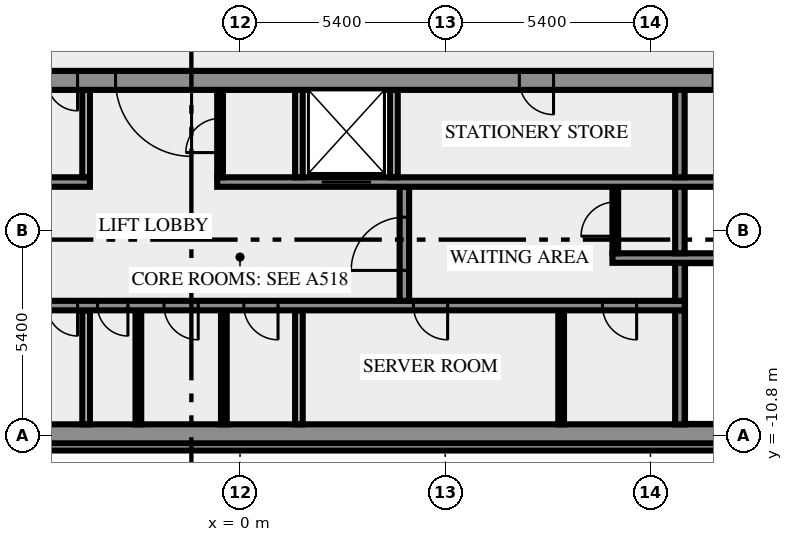
"""IFC4 building model, lengths in metres.
Left out: names, types, materials, properties, quantities, classifications, styles, units other than length and angle.
Written with IfcOpenShell. Run it as: python <this file> out.ifc"""

import sys

from ifc_helpers import new_model, si_unit, direction, frame, frame_2d, origin, place, context, subcontext, project, spatial, rectangle, extrude, element, fill, save


model = new_model("IFC4")
c1 = context("Model", 3, precision=1e-05, world=origin(), true_north=direction((0.0, 1.0)))
c2 = subcontext(c1, "Body", "Model", "MODEL_VIEW")
j1 = project(units=[si_unit("LENGTHUNIT", "METRE"), si_unit("PLANEANGLEUNIT", "RADIAN")], contexts=[c1])
p1 = place(None, origin())
s1 = spatial("IfcSite", under=j1, at=p1, CompositionType="ELEMENT")
p2 = place(p1, origin())
s2 = spatial("IfcBuilding", under=s1, at=p2, CompositionType="ELEMENT")
p3 = place(p2, frame((0.0, 0.0, 311.0)))
s3 = spatial("IfcBuildingStorey", under=s2, at=p3, CompositionType="ELEMENT", Elevation=311.0)
p4 = place(p3, frame((-17.444, -11.088, 0.0), z_axis=(0.0, 0.0, 1.0), x_axis=(1.0, 0.0, 0.0)))
e1 = element("IfcWall", 1, at=p4, inside=s3, PredefinedType="SOLIDWALL", context=c2, shape_type="SweptSolid", body=[
    extrude(rectangle(XDim=34.888, YDim=0.2, at=frame_2d((17.444, 0.0))), origin(), (0.0, 0.0, 1.0), 3.65),
])
p5 = place(p3, frame((-20.0, -10.75, 0.0), z_axis=(0.0, 0.0, 1.0), x_axis=(1.0, 0.0, 0.0)))
e2 = element("IfcWall", 2, at=p5, inside=s3, PredefinedType="SHEAR", context=c2, shape_type="SweptSolid", body=[
    extrude(rectangle(XDim=40.0, YDim=0.5, at=frame_2d((20.0, 0.0))), origin(), (0.0, 0.0, 1.0), 3.65),
])
p6 = place(p5, frame((0.8, 0.0, 1.0)))
e3 = element("IfcOpeningElement", 3, at=p6, cuts=e2, PredefinedType="OPENING", context=c2, shape_type="SweptSolid", body=[
    extrude(rectangle(XDim=1.2, YDim=1.2, at=frame_2d((0.6, 0.6))), frame((0.0, 0.26, 0.0), z_axis=(0.0, -1.0, 0.0), x_axis=(1.0, 0.0, 0.0)), (0.0, 0.0, 1.0), 0.52),
])
p7 = place(p5, frame((38.0, 0.0, 1.0)))
e4 = element("IfcOpeningElement", 4, at=p7, cuts=e2, PredefinedType="OPENING", context=c2, shape_type="SweptSolid", body=[
    extrude(rectangle(XDim=1.2, YDim=1.2, at=frame_2d((0.6, 0.6))), frame((0.0, 0.26, 0.0), z_axis=(0.0, -1.0, 0.0), x_axis=(1.0, 0.0, 0.0)), (0.0, 0.0, 1.0), 0.52),
])
p8 = place(p3, frame((-4.05, -10.5, 0.0), z_axis=(0.0, 0.0, 1.0), x_axis=(0.0, 1.0, 0.0)))
e5 = element("IfcWall", 5, at=p8, inside=s3, PredefinedType="SOLIDWALL", context=c2, shape_type="SweptSolid", body=[
    extrude(rectangle(XDim=3.0, YDim=0.2, at=frame_2d((1.5, 0.0))), origin(), (0.0, 0.0, 1.0), 3.65),
])
for number, where, z_axis, x_axis in (
    (6, (-2.675, -10.5, 0.0), (0.0, 0.0, 1.0), (0.0, 1.0, 0.0)),
    (7, (-0.425, -10.5, 0.0), (0.0, 0.0, 1.0), (0.0, 1.0, 0.0)),
):
    element("IfcWall", number, at=place(p3, frame(where, z_axis=z_axis, x_axis=x_axis)), inside=s3, PredefinedType="PARTITIONING", context=c2, shape_type="SweptSolid", body=[
        extrude(rectangle(XDim=3.0, YDim=0.15, at=frame_2d((1.5, 0.0))), origin(), (0.0, 0.0, 1.0), 3.65),
    ])
p9 = place(p3, frame((1.55, -10.5, 0.0), z_axis=(0.0, 0.0, 1.0), x_axis=(0.0, 1.0, 0.0)))
e8 = element("IfcWall", 8, at=p9, inside=s3, PredefinedType="SOLIDWALL", context=c2, shape_type="SweptSolid", body=[
    extrude(rectangle(XDim=3.0, YDim=0.2, at=frame_2d((1.5, 0.0))), origin(), (0.0, 0.0, 1.0), 3.65),
])
p10 = place(p3, frame((8.45, -10.5, 0.0), z_axis=(0.0, 0.0, 1.0), x_axis=(0.0, 1.0, 0.0)))
e9 = element("IfcWall", 9, at=p10, inside=s3, PredefinedType="PARTITIONING", context=c2, shape_type="SweptSolid", body=[
    extrude(rectangle(XDim=3.0, YDim=0.15, at=frame_2d((1.5, 0.0))), origin(), (0.0, 0.0, 1.0), 3.65),
])
p11 = place(p3, frame((11.575, -10.5, 0.0), z_axis=(0.0, 0.0, 1.0), x_axis=(0.0, 1.0, 0.0)))
e10 = element("IfcWall", 10, at=p11, inside=s3, PredefinedType="SHEAR", context=c2, shape_type="SweptSolid", body=[
    extrude(rectangle(XDim=3.0, YDim=0.25, at=frame_2d((1.5, 0.0))), origin(), (0.0, 0.0, 1.0), 3.65),
])
p12 = place(p3, frame((11.7, -7.375, 0.0), z_axis=(0.0, 0.0, 1.0), x_axis=(-1.0, 0.0, 0.0)))
e11 = element("IfcWall", 11, at=p12, inside=s3, PredefinedType="SHEAR", context=c2, shape_type="SweptSolid", body=[
    extrude(rectangle(XDim=23.4, YDim=0.25, at=frame_2d((11.7, 0.0))), origin(), (0.0, 0.0, 1.0), 3.65),
])
p13 = place(p12, frame((22.225, 0.0, 0.0)))
e12 = element("IfcOpeningElement", 12, at=p13, cuts=e11, PredefinedType="OPENING", context=c2, shape_type="SweptSolid", body=[
    extrude(rectangle(XDim=0.8, YDim=2.1, at=frame_2d((0.4, 1.05))), frame((0.0, 0.135, 0.0), z_axis=(0.0, -1.0, 0.0), x_axis=(1.0, 0.0, 0.0)), (0.0, 0.0, 1.0), 0.27),
])
p14 = place(p12, frame((20.2, 0.0, 0.0)))
e13 = element("IfcOpeningElement", 13, at=p14, cuts=e11, PredefinedType="OPENING", context=c2, shape_type="SweptSolid", body=[
    extrude(rectangle(XDim=1.1, YDim=2.1, at=frame_2d((0.55, 1.05))), frame((0.0, 0.135, 0.0), z_axis=(0.0, -1.0, 0.0), x_axis=(1.0, 0.0, 0.0)), (0.0, 0.0, 1.0), 0.27),
])
p15 = place(p12, frame((17.7, 0.0, 0.0)))
e14 = element("IfcOpeningElement", 14, at=p15, cuts=e11, PredefinedType="OPENING", context=c2, shape_type="SweptSolid", body=[
    extrude(rectangle(XDim=1.1, YDim=2.1, at=frame_2d((0.55, 1.05))), frame((0.0, 0.135, 0.0), z_axis=(0.0, -1.0, 0.0), x_axis=(1.0, 0.0, 0.0)), (0.0, 0.0, 1.0), 0.27),
])
p16 = place(p12, frame((15.975, 0.0, 0.0)))
e15 = element("IfcOpeningElement", 15, at=p16, cuts=e11, PredefinedType="OPENING", context=c2, shape_type="SweptSolid", body=[
    extrude(rectangle(XDim=0.8, YDim=2.1, at=frame_2d((0.4, 1.05))), frame((0.0, 0.135, 0.0), z_axis=(0.0, -1.0, 0.0), x_axis=(1.0, 0.0, 0.0)), (0.0, 0.0, 1.0), 0.27),
])
p17 = place(p12, frame((14.65, 0.0, 0.0)))
e16 = element("IfcOpeningElement", 16, at=p17, cuts=e11, PredefinedType="OPENING", context=c2, shape_type="SweptSolid", body=[
    extrude(rectangle(XDim=0.8, YDim=2.1, at=frame_2d((0.4, 1.05))), frame((0.0, 0.135, 0.0), z_axis=(0.0, -1.0, 0.0), x_axis=(1.0, 0.0, 0.0)), (0.0, 0.0, 1.0), 0.27),
])
p18 = place(p12, frame((12.8, 0.0, 0.0)))
e17 = element("IfcOpeningElement", 17, at=p18, cuts=e11, PredefinedType="OPENING", context=c2, shape_type="SweptSolid", body=[
    extrude(rectangle(XDim=0.9, YDim=2.1, at=frame_2d((0.45, 1.05))), frame((0.0, 0.135, 0.0), z_axis=(0.0, -1.0, 0.0), x_axis=(1.0, 0.0, 0.0)), (0.0, 0.0, 1.0), 0.27),
])
p19 = place(p12, frame((10.7, 0.0, 0.0)))
e18 = element("IfcOpeningElement", 18, at=p19, cuts=e11, PredefinedType="OPENING", context=c2, shape_type="SweptSolid", body=[
    extrude(rectangle(XDim=0.9, YDim=2.1, at=frame_2d((0.45, 1.05))), frame((0.0, 0.135, 0.0), z_axis=(0.0, -1.0, 0.0), x_axis=(1.0, 0.0, 0.0)), (0.0, 0.0, 1.0), 0.27),
])
p20 = place(p12, frame((6.237, 0.0, 0.0)))
e19 = element("IfcOpeningElement", 19, at=p20, cuts=e11, PredefinedType="OPENING", context=c2, shape_type="SweptSolid", body=[
    extrude(rectangle(XDim=0.9, YDim=2.1, at=frame_2d((0.45, 1.05))), frame((0.0, 0.135, 0.0), z_axis=(0.0, -1.0, 0.0), x_axis=(1.0, 0.0, 0.0)), (0.0, 0.0, 1.0), 0.27),
])
p21 = place(p12, frame((1.263, 0.0, 0.0)))
e20 = element("IfcOpeningElement", 20, at=p21, cuts=e11, PredefinedType="OPENING", context=c2, shape_type="SweptSolid", body=[
    extrude(rectangle(XDim=0.9, YDim=2.1, at=frame_2d((0.45, 1.05))), frame((0.0, 0.135, 0.0), z_axis=(0.0, -1.0, 0.0), x_axis=(1.0, 0.0, 0.0)), (0.0, 0.0, 1.0), 0.27),
])
p22 = place(p3, frame((4.325, -7.25, 0.0), z_axis=(0.0, 0.0, 1.0), x_axis=(0.0, 1.0, 0.0)))
e21 = element("IfcWall", 21, at=p22, inside=s3, PredefinedType="SHEAR", context=c2, shape_type="SweptSolid", body=[
    extrude(rectangle(XDim=3.0, YDim=0.25, at=frame_2d((1.5, 0.0))), origin(), (0.0, 0.0, 1.0), 3.65),
])
p23 = place(p22, frame((0.8, 0.0, 0.0)))
e22 = element("IfcOpeningElement", 22, at=p23, cuts=e21, PredefinedType="OPENING", context=c2, shape_type="SweptSolid", body=[
    extrude(rectangle(XDim=1.4, YDim=2.1, at=frame_2d((0.7, 1.05))), frame((0.0, 0.135, 0.0), z_axis=(0.0, -1.0, 0.0), x_axis=(1.0, 0.0, 0.0)), (0.0, 0.0, 1.0), 0.27),
])
p24 = place(p3, frame((11.575, -7.25, 0.0), z_axis=(0.0, 0.0, 1.0), x_axis=(0.0, 1.0, 0.0)))
e23 = element("IfcWall", 23, at=p24, inside=s3, PredefinedType="SHEAR", context=c2, shape_type="SweptSolid", body=[
    extrude(rectangle(XDim=1.0, YDim=0.25, at=frame_2d((0.5, 0.0))), origin(), (0.0, 0.0, 1.0), 3.65),
])
p25 = place(p3, frame((20.0, -6.125, 0.0), z_axis=(0.0, 0.0, 1.0), x_axis=(-1.0, 0.0, 0.0)))
e24 = element("IfcWall", 24, at=p25, inside=s3, PredefinedType="SHEAR", context=c2, shape_type="SweptSolid", body=[
    extrude(rectangle(XDim=10.2, YDim=0.25, at=frame_2d((5.1, 0.0))), origin(), (0.0, 0.0, 1.0), 3.65),
])
p26 = place(p25, frame((0.55, 0.0, 0.0)))
e25 = element("IfcOpeningElement", 25, at=p26, cuts=e24, PredefinedType="OPENING", context=c2, shape_type="SweptSolid", body=[
    extrude(rectangle(XDim=1.8, YDim=2.1, at=frame_2d((0.9, 1.05))), frame((0.0, 0.135, 0.0), z_axis=(0.0, -1.0, 0.0), x_axis=(1.0, 0.0, 0.0)), (0.0, 0.0, 1.0), 0.27),
])
p27 = place(p3, frame((9.875, -6.0, 0.0), z_axis=(0.0, 0.0, 1.0), x_axis=(0.0, 1.0, 0.0)))
e26 = element("IfcWall", 26, at=p27, inside=s3, PredefinedType="PARTITIONING", context=c2, shape_type="SweptSolid", body=[
    extrude(rectangle(XDim=1.75, YDim=0.15, at=frame_2d((0.875, 0.0))), origin(), (0.0, 0.0, 1.0), 3.65),
])
p28 = place(p27, frame((0.45, 0.0, 0.0)))
e27 = element("IfcOpeningElement", 27, at=p28, cuts=e26, PredefinedType="OPENING", context=c2, shape_type="SweptSolid", body=[
    extrude(rectangle(XDim=0.9, YDim=2.1, at=frame_2d((0.45, 1.05))), frame((0.0, 0.085, 0.0), z_axis=(0.0, -1.0, 0.0), x_axis=(1.0, 0.0, 0.0)), (0.0, 0.0, 1.0), 0.17),
])
p29 = place(p3, frame((11.575, -6.0, 0.0), z_axis=(0.0, 0.0, 1.0), x_axis=(0.0, 1.0, 0.0)))
e28 = element("IfcWall", 28, at=p29, inside=s3, PredefinedType="SHEAR", context=c2, shape_type="SweptSolid", body=[
    extrude(rectangle(XDim=1.75, YDim=0.25, at=frame_2d((0.875, 0.0))), origin(), (0.0, 0.0, 1.0), 3.65),
])
p30 = place(p3, frame((-14.35, -4.125, 0.0), z_axis=(0.0, 0.0, 1.0), x_axis=(1.0, 0.0, 0.0)))
e29 = element("IfcWall", 29, at=p30, inside=s3, PredefinedType="SHEAR", context=c2, shape_type="SweptSolid", body=[
    extrude(rectangle(XDim=10.4, YDim=0.25, at=frame_2d((5.2, 0.0))), origin(), (0.0, 0.0, 1.0), 3.65),
])
p31 = place(p30, frame((4.75, 0.0, 0.0)))
e30 = element("IfcOpeningElement", 30, at=p31, cuts=e29, PredefinedType="OPENING", context=c2, shape_type="SweptSolid", body=[
    extrude(rectangle(XDim=1.1, YDim=2.1, at=frame_2d((0.55, 1.05))), frame((0.0, 0.135, 0.0), z_axis=(0.0, -1.0, 0.0), x_axis=(1.0, 0.0, 0.0)), (0.0, 0.0, 1.0), 0.27),
])
p32 = place(p30, frame((7.25, 0.0, 0.0)))
e31 = element("IfcOpeningElement", 31, at=p32, cuts=e29, PredefinedType="OPENING", context=c2, shape_type="SweptSolid", body=[
    extrude(rectangle(XDim=1.1, YDim=2.1, at=frame_2d((0.55, 1.05))), frame((0.0, 0.135, 0.0), z_axis=(0.0, -1.0, 0.0), x_axis=(1.0, 0.0, 0.0)), (0.0, 0.0, 1.0), 0.27),
])
p33 = place(p3, frame((-0.6, -4.125, 0.0), z_axis=(0.0, 0.0, 1.0), x_axis=(1.0, 0.0, 0.0)))
e32 = element("IfcWall", 32, at=p33, inside=s3, PredefinedType="SHEAR", context=c2, shape_type="SweptSolid", body=[
    extrude(rectangle(XDim=14.95, YDim=0.25, at=frame_2d((7.475, 0.0))), origin(), (0.0, 0.0, 1.0), 3.65),
])
p34 = place(p33, frame((2.75, 0.0, 0.0)))
e33 = element("IfcOpeningElement", 33, at=p34, cuts=e32, PredefinedType="OPENING", context=c2, shape_type="SweptSolid", body=[
    extrude(rectangle(XDim=1.3, YDim=2.1, at=frame_2d((0.65, 1.05))), frame((0.0, 0.135, 0.0), z_axis=(0.0, -1.0, 0.0), x_axis=(1.0, 0.0, 0.0)), (0.0, 0.0, 1.0), 0.27),
])
p35 = place(p3, frame((-4.05, -4.0, 0.0), z_axis=(0.0, 0.0, 1.0), x_axis=(0.0, 1.0, 0.0)))
e34 = element("IfcWall", 34, at=p35, inside=s3, PredefinedType="SOLIDWALL", context=c2, shape_type="SweptSolid", body=[
    extrude(rectangle(XDim=2.3, YDim=0.2, at=frame_2d((1.15, 0.0))), origin(), (0.0, 0.0, 1.0), 3.65),
])
p36 = place(p3, frame((-0.525, -4.0, 0.0), z_axis=(0.0, 0.0, 1.0), x_axis=(0.0, 1.0, 0.0)))
e35 = element("IfcWall", 35, at=p36, inside=s3, PredefinedType="PARTITIONING", context=c2, shape_type="SweptSolid", body=[
    extrude(rectangle(XDim=2.3, YDim=0.15, at=frame_2d((1.15, 0.0))), origin(), (0.0, 0.0, 1.0), 3.65),
])
p37 = place(p36, frame((0.65, 0.0, 0.0)))
e36 = element("IfcOpeningElement", 36, at=p37, cuts=e35, PredefinedType="OPENING", context=c2, shape_type="SweptSolid", body=[
    extrude(rectangle(XDim=0.9, YDim=2.1, at=frame_2d((0.45, 1.05))), frame((0.0, 0.085, 0.0), z_axis=(0.0, -1.0, 0.0), x_axis=(1.0, 0.0, 0.0)), (0.0, 0.0, 1.0), 0.17),
])
for number, where, z_axis, x_axis in (
    (37, (1.55, -4.0, 0.0), (0.0, 0.0, 1.0), (0.0, 1.0, 0.0)),
    (38, (4.05, -4.0, 0.0), (0.0, 0.0, 1.0), (0.0, 1.0, 0.0)),
):
    element("IfcWall", number, at=place(p3, frame(where, z_axis=z_axis, x_axis=x_axis)), inside=s3, PredefinedType="SOLIDWALL", context=c2, shape_type="SweptSolid", body=[
        extrude(rectangle(XDim=2.3, YDim=0.2, at=frame_2d((1.15, 0.0))), origin(), (0.0, 0.0, 1.0), 3.65),
    ])
p38 = place(p3, frame((11.575, -4.0, 0.0), z_axis=(0.0, 0.0, 1.0), x_axis=(0.0, 1.0, 0.0)))
e39 = element("IfcWall", 39, at=p38, inside=s3, PredefinedType="SHEAR", context=c2, shape_type="SweptSolid", body=[
    extrude(rectangle(XDim=2.3, YDim=0.25, at=frame_2d((1.15, 0.0))), origin(), (0.0, 0.0, 1.0), 3.65),
])
p39 = place(p3, frame((20.49, -1.45, 0.0), z_axis=(0.0, 0.0, 1.0), x_axis=(-1.0, 0.0, 0.0)))
e40 = element("IfcWall", 40, at=p39, inside=s3, PredefinedType="SHEAR", context=c2, shape_type="SweptSolid", body=[
    extrude(rectangle(XDim=40.98, YDim=0.5, at=frame_2d((20.49, 0.0))), origin(), (0.0, 0.0, 1.0), 3.65),
])
p40 = place(p39, frame((38.14, 0.0, 0.0)))
e41 = element("IfcOpeningElement", 41, at=p40, cuts=e40, PredefinedType="OPENING", context=c2, shape_type="SweptSolid", body=[
    extrude(rectangle(XDim=1.8, YDim=2.1, at=frame_2d((0.9, 1.05))), frame((0.0, 0.26, 0.0), z_axis=(0.0, -1.0, 0.0), x_axis=(1.0, 0.0, 0.0)), (0.0, 0.0, 1.0), 0.52),
])
p41 = place(p39, frame((35.89, 0.0, 0.0)))
e42 = element("IfcOpeningElement", 42, at=p41, cuts=e40, PredefinedType="OPENING", context=c2, shape_type="SweptSolid", body=[
    extrude(rectangle(XDim=0.9, YDim=2.1, at=frame_2d((0.45, 1.05))), frame((0.0, 0.26, 0.0), z_axis=(0.0, -1.0, 0.0), x_axis=(1.0, 0.0, 0.0)), (0.0, 0.0, 1.0), 0.52),
])
p42 = place(p39, frame((32.94, 0.0, 0.0)))
e43 = element("IfcOpeningElement", 43, at=p42, cuts=e40, PredefinedType="OPENING", context=c2, shape_type="SweptSolid", body=[
    extrude(rectangle(XDim=0.9, YDim=2.1, at=frame_2d((0.45, 1.05))), frame((0.0, 0.26, 0.0), z_axis=(0.0, -1.0, 0.0), x_axis=(1.0, 0.0, 0.0)), (0.0, 0.0, 1.0), 0.52),
])
p43 = place(p39, frame((31.015, 0.0, 0.0)))
e44 = element("IfcOpeningElement", 44, at=p43, cuts=e40, PredefinedType="OPENING", context=c2, shape_type="SweptSolid", body=[
    extrude(rectangle(XDim=0.8, YDim=2.1, at=frame_2d((0.4, 1.05))), frame((0.0, 0.26, 0.0), z_axis=(0.0, -1.0, 0.0), x_axis=(1.0, 0.0, 0.0)), (0.0, 0.0, 1.0), 0.52),
])
p44 = place(p39, frame((24.765, 0.0, 0.0)))
e45 = element("IfcOpeningElement", 45, at=p44, cuts=e40, PredefinedType="OPENING", context=c2, shape_type="SweptSolid", body=[
    extrude(rectangle(XDim=0.8, YDim=2.1, at=frame_2d((0.4, 1.05))), frame((0.0, 0.26, 0.0), z_axis=(0.0, -1.0, 0.0), x_axis=(1.0, 0.0, 0.0)), (0.0, 0.0, 1.0), 0.52),
])
p45 = place(p39, frame((21.765, 0.0, 0.0)))
e46 = element("IfcOpeningElement", 46, at=p45, cuts=e40, PredefinedType="OPENING", context=c2, shape_type="SweptSolid", body=[
    extrude(rectangle(XDim=2.0, YDim=2.1, at=frame_2d((1.0, 1.05))), frame((0.0, 0.26, 0.0), z_axis=(0.0, -1.0, 0.0), x_axis=(1.0, 0.0, 0.0)), (0.0, 0.0, 1.0), 0.52),
])
p46 = place(p39, frame((12.24, 0.0, 0.0)))
e47 = element("IfcOpeningElement", 47, at=p46, cuts=e40, PredefinedType="OPENING", context=c2, shape_type="SweptSolid", body=[
    extrude(rectangle(XDim=0.9, YDim=2.1, at=frame_2d((0.45, 1.05))), frame((0.0, 0.26, 0.0), z_axis=(0.0, -1.0, 0.0), x_axis=(1.0, 0.0, 0.0)), (0.0, 0.0, 1.0), 0.52),
])
p47 = place(p39, frame((7.14, 0.0, 0.0)))
e48 = element("IfcOpeningElement", 48, at=p47, cuts=e40, PredefinedType="OPENING", context=c2, shape_type="SweptSolid", body=[
    extrude(rectangle(XDim=0.9, YDim=2.1, at=frame_2d((0.45, 1.05))), frame((0.0, 0.26, 0.0), z_axis=(0.0, -1.0, 0.0), x_axis=(1.0, 0.0, 0.0)), (0.0, 0.0, 1.0), 0.52),
])
p48 = place(p39, frame((5.028, 0.0, 0.0)))
e49 = element("IfcOpeningElement", 49, at=p48, cuts=e40, PredefinedType="OPENING", context=c2, shape_type="SweptSolid", body=[
    extrude(rectangle(XDim=0.8, YDim=2.1, at=frame_2d((0.4, 1.05))), frame((0.0, 0.26, 0.0), z_axis=(0.0, -1.0, 0.0), x_axis=(1.0, 0.0, 0.0)), (0.0, 0.0, 1.0), 0.52),
])
p49 = place(p39, frame((3.452, 0.0, 0.0)))
e50 = element("IfcOpeningElement", 50, at=p49, cuts=e40, PredefinedType="OPENING", context=c2, shape_type="SweptSolid", body=[
    extrude(rectangle(XDim=0.8, YDim=2.1, at=frame_2d((0.4, 1.05))), frame((0.0, 0.26, 0.0), z_axis=(0.0, -1.0, 0.0), x_axis=(1.0, 0.0, 0.0)), (0.0, 0.0, 1.0), 0.52),
])
p50 = place(p39, frame((1.04, 0.0, 0.0)))
e51 = element("IfcOpeningElement", 51, at=p50, cuts=e40, PredefinedType="OPENING", context=c2, shape_type="SweptSolid", body=[
    extrude(rectangle(XDim=1.8, YDim=2.1, at=frame_2d((0.9, 1.05))), frame((0.0, 0.26, 0.0), z_axis=(0.0, -1.0, 0.0), x_axis=(1.0, 0.0, 0.0)), (0.0, 0.0, 1.0), 0.52),
])
p51 = place(p16, origin())
e52 = element("IfcDoor", 52, at=p51, inside=s3, OperationType="SINGLE_SWING_RIGHT", PredefinedType="DOOR", context=c2, shape_type="SweptSolid", body=[
    extrude(rectangle(XDim=0.8, YDim=2.1, at=frame_2d((0.4, 1.05))), frame((0.0, 0.025, 0.0), z_axis=(0.0, -1.0, 0.0), x_axis=(1.0, 0.0, 0.0)), (0.0, 0.0, 1.0), 0.05),
])
fill(e15, e52)
p52 = place(p17, origin())
e53 = element("IfcDoor", 53, at=p52, inside=s3, OperationType="SINGLE_SWING_RIGHT", PredefinedType="DOOR", context=c2, shape_type="SweptSolid", body=[
    extrude(rectangle(XDim=0.8, YDim=2.1, at=frame_2d((0.4, 1.05))), frame((0.0, 0.025, 0.0), z_axis=(0.0, -1.0, 0.0), x_axis=(1.0, 0.0, 0.0)), (0.0, 0.0, 1.0), 0.05),
])
fill(e16, e53)
p53 = place(p18, origin())
e54 = element("IfcDoor", 54, at=p53, inside=s3, OperationType="SINGLE_SWING_RIGHT", PredefinedType="DOOR", context=c2, shape_type="SweptSolid", body=[
    extrude(rectangle(XDim=0.9, YDim=2.1, at=frame_2d((0.45, 1.05))), frame((0.0, 0.025, 0.0), z_axis=(0.0, -1.0, 0.0), x_axis=(1.0, 0.0, 0.0)), (0.0, 0.0, 1.0), 0.05),
])
fill(e17, e54)
p54 = place(p19, origin())
e55 = element("IfcDoor", 55, at=p54, inside=s3, OperationType="SINGLE_SWING_LEFT", PredefinedType="DOOR", context=c2, shape_type="SweptSolid", body=[
    extrude(rectangle(XDim=0.9, YDim=2.1, at=frame_2d((0.45, 1.05))), frame((0.0, 0.025, 0.0), z_axis=(0.0, -1.0, 0.0), x_axis=(1.0, 0.0, 0.0)), (0.0, 0.0, 1.0), 0.05),
])
fill(e18, e55)
p55 = place(p20, origin())
e56 = element("IfcDoor", 56, at=p55, inside=s3, OperationType="SINGLE_SWING_LEFT", PredefinedType="DOOR", context=c2, shape_type="SweptSolid", body=[
    extrude(rectangle(XDim=0.9, YDim=2.1, at=frame_2d((0.45, 1.05))), frame((0.0, 0.025, 0.0), z_axis=(0.0, -1.0, 0.0), x_axis=(1.0, 0.0, 0.0)), (0.0, 0.0, 1.0), 0.05),
])
fill(e19, e56)
p56 = place(p21, origin())
e57 = element("IfcDoor", 57, at=p56, inside=s3, OperationType="SINGLE_SWING_LEFT", PredefinedType="DOOR", context=c2, shape_type="SweptSolid", body=[
    extrude(rectangle(XDim=0.9, YDim=2.1, at=frame_2d((0.45, 1.05))), frame((0.0, 0.025, 0.0), z_axis=(0.0, -1.0, 0.0), x_axis=(1.0, 0.0, 0.0)), (0.0, 0.0, 1.0), 0.05),
])
fill(e20, e57)
p57 = place(p23, origin())
e58 = element("IfcDoor", 58, at=p57, inside=s3, OperationType="DOUBLE_DOOR_SINGLE_SWING", PredefinedType="DOOR", context=c2, shape_type="SweptSolid", body=[
    extrude(rectangle(XDim=1.4, YDim=2.1, at=frame_2d((0.7, 1.05))), frame((0.0, 0.025, 0.0), z_axis=(0.0, -1.0, 0.0), x_axis=(1.0, 0.0, 0.0)), (0.0, 0.0, 1.0), 0.05),
])
fill(e22, e58)
p58 = place(p28, origin())
e59 = element("IfcDoor", 59, at=p58, inside=s3, OperationType="SINGLE_SWING_RIGHT", PredefinedType="DOOR", context=c2, shape_type="SweptSolid", body=[
    extrude(rectangle(XDim=0.9, YDim=2.1, at=frame_2d((0.45, 1.05))), frame((0.0, 0.025, 0.0), z_axis=(0.0, -1.0, 0.0), x_axis=(1.0, 0.0, 0.0)), (0.0, 0.0, 1.0), 0.05),
])
fill(e27, e59)
p59 = place(p34, origin())
e60 = element("IfcDoor", 60, at=p59, inside=s3, OperationType="DOUBLE_DOOR_SLIDING", PredefinedType="DOOR", context=c2, shape_type="SweptSolid", body=[
    extrude(rectangle(XDim=1.3, YDim=2.1, at=frame_2d((0.65, 1.05))), frame((0.0, 0.025, 0.0), z_axis=(0.0, -1.0, 0.0), x_axis=(1.0, 0.0, 0.0)), (0.0, 0.0, 1.0), 0.05),
])
fill(e33, e60)
p60 = place(p37, origin())
e61 = element("IfcDoor", 61, at=p60, inside=s3, OperationType="SINGLE_SWING_LEFT", PredefinedType="DOOR", context=c2, shape_type="SweptSolid", body=[
    extrude(rectangle(XDim=0.9, YDim=2.1, at=frame_2d((0.45, 1.05))), frame((0.0, 0.025, 0.0), z_axis=(0.0, -1.0, 0.0), x_axis=(1.0, 0.0, 0.0)), (0.0, 0.0, 1.0), 0.05),
])
fill(e36, e61)
p61 = place(p44, origin())
e62 = element("IfcDoor", 62, at=p61, inside=s3, OperationType="SINGLE_SWING_RIGHT", PredefinedType="DOOR", context=c2, shape_type="SweptSolid", body=[
    extrude(rectangle(XDim=0.8, YDim=2.1, at=frame_2d((0.4, 1.05))), frame((0.0, 0.025, 0.0), z_axis=(0.0, -1.0, 0.0), x_axis=(1.0, 0.0, 0.0)), (0.0, 0.0, 1.0), 0.05),
])
fill(e45, e62)
p62 = place(p45, origin())
e63 = element("IfcDoor", 63, at=p62, inside=s3, OperationType="DOUBLE_DOOR_SINGLE_SWING", PredefinedType="DOOR", context=c2, shape_type="SweptSolid", body=[
    extrude(rectangle(XDim=2.0, YDim=2.1, at=frame_2d((1.0, 1.05))), frame((0.0, 0.025, 0.0), z_axis=(0.0, -1.0, 0.0), x_axis=(1.0, 0.0, 0.0)), (0.0, 0.0, 1.0), 0.05),
])
fill(e46, e63)
p63 = place(p46, origin())
e64 = element("IfcDoor", 64, at=p63, inside=s3, OperationType="SINGLE_SWING_LEFT", PredefinedType="DOOR", context=c2, shape_type="SweptSolid", body=[
    extrude(rectangle(XDim=0.9, YDim=2.1, at=frame_2d((0.45, 1.05))), frame((0.0, 0.025, 0.0), z_axis=(0.0, -1.0, 0.0), x_axis=(1.0, 0.0, 0.0)), (0.0, 0.0, 1.0), 0.05),
])
fill(e47, e64)
save(model, sys.argv[1])
